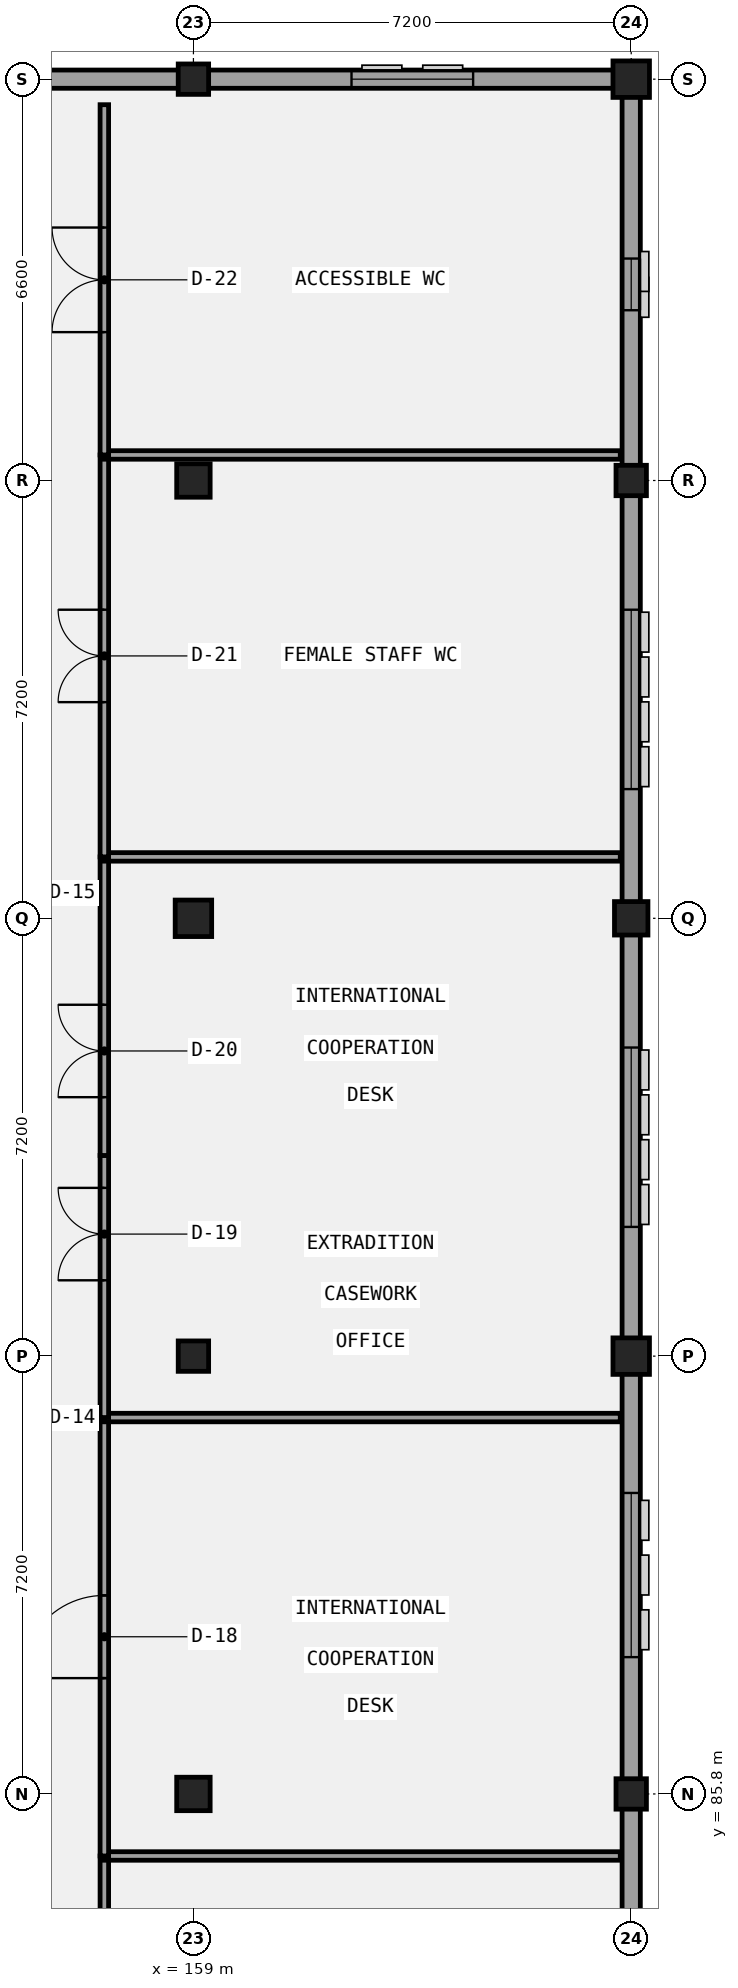
"""IFC4 building model, lengths in metres.
Left out: names, types, materials, properties, quantities, classifications, styles, units other than length and angle.
Written with IfcOpenShell. Run it as: python <this file> out.ifc"""

import sys

from ifc_helpers import new_model, si_unit, direction, frame, frame_2d, origin, origin_2d, place, context, subcontext, project, spatial, rectangle, extrude, element, fill, save


model = new_model("IFC4")
c1 = context("Model", 3, precision=1e-05, world=origin(), true_north=direction((0.0, 1.0)))
c2 = subcontext(c1, "Body", "Model", "MODEL_VIEW")
j1 = project(units=[si_unit("LENGTHUNIT", "METRE"), si_unit("PLANEANGLEUNIT", "RADIAN")], contexts=[c1])
p1 = place(None, origin())
s1 = spatial("IfcSite", under=j1, at=p1, CompositionType="ELEMENT")
p2 = place(p1, origin())
s2 = spatial("IfcBuilding", under=s1, at=p2, CompositionType="ELEMENT")
p3 = place(p2, frame((0.0, 0.0, 18.0)))
s3 = spatial("IfcBuildingStorey", under=s2, at=p3, CompositionType="ELEMENT", Elevation=18.0)
p4 = place(p3, frame((159.0, 85.8, 0.0), z_axis=(0.0, 0.0, 1.0), x_axis=(1.0, 0.0, 0.0)))
e1 = element("IfcColumn", 1, at=p4, inside=s3, PredefinedType="COLUMN", context=c2, shape_type="SweptSolid", body=[
    extrude(rectangle(XDim=0.55, YDim=0.55, at=origin_2d()), origin(), (0.0, 0.0, 1.0), 4.2),
])
p5 = place(p3, frame((159.0, 93.0, 0.0), z_axis=(0.0, 0.0, 1.0), x_axis=(1.0, 0.0, 0.0)))
e2 = element("IfcColumn", 2, at=p5, inside=s3, PredefinedType="COLUMN", context=c2, shape_type="SweptSolid", body=[
    extrude(rectangle(XDim=0.5, YDim=0.5, at=origin_2d()), origin(), (0.0, 0.0, 1.0), 4.2),
])
p6 = place(p3, frame((159.0, 100.2, 0.0), z_axis=(0.0, 0.0, 1.0), x_axis=(1.0, 0.0, 0.0)))
e3 = element("IfcColumn", 3, at=p6, inside=s3, PredefinedType="COLUMN", context=c2, shape_type="SweptSolid", body=[
    extrude(rectangle(XDim=0.6, YDim=0.6, at=origin_2d()), origin(), (0.0, 0.0, 1.0), 4.2),
])
p7 = place(p3, frame((159.0, 107.4, 0.0), z_axis=(0.0, 0.0, 1.0), x_axis=(1.0, 0.0, 0.0)))
e4 = element("IfcColumn", 4, at=p7, inside=s3, PredefinedType="COLUMN", context=c2, shape_type="SweptSolid", body=[
    extrude(rectangle(XDim=0.55, YDim=0.55, at=origin_2d()), origin(), (0.0, 0.0, 1.0), 4.2),
])
for number, where, z_axis, x_axis in (
    (5, (159.0, 114.0, 0.0), (0.0, 0.0, 1.0), (1.0, 0.0, 0.0)),
    (6, (166.2, 85.8, 0.0), (0.0, 0.0, 1.0), (1.0, 0.0, 0.0)),
):
    element("IfcColumn", number, at=place(p3, frame(where, z_axis=z_axis, x_axis=x_axis)), inside=s3, PredefinedType="COLUMN", context=c2, shape_type="SweptSolid", body=[
        extrude(rectangle(XDim=0.5, YDim=0.5, at=origin_2d()), origin(), (0.0, 0.0, 1.0), 4.2),
    ])
p8 = place(p3, frame((166.2, 93.0, 0.0), z_axis=(0.0, 0.0, 1.0), x_axis=(1.0, 0.0, 0.0)))
e7 = element("IfcColumn", 7, at=p8, inside=s3, PredefinedType="COLUMN", context=c2, shape_type="SweptSolid", body=[
    extrude(rectangle(XDim=0.6, YDim=0.6, at=origin_2d()), origin(), (0.0, 0.0, 1.0), 4.2),
])
p9 = place(p3, frame((166.2, 100.2, 0.0), z_axis=(0.0, 0.0, 1.0), x_axis=(1.0, 0.0, 0.0)))
e8 = element("IfcColumn", 8, at=p9, inside=s3, PredefinedType="COLUMN", context=c2, shape_type="SweptSolid", body=[
    extrude(rectangle(XDim=0.55, YDim=0.55, at=origin_2d()), origin(), (0.0, 0.0, 1.0), 4.2),
])
p10 = place(p3, frame((166.2, 107.4, 0.0), z_axis=(0.0, 0.0, 1.0), x_axis=(1.0, 0.0, 0.0)))
e9 = element("IfcColumn", 9, at=p10, inside=s3, PredefinedType="COLUMN", context=c2, shape_type="SweptSolid", body=[
    extrude(rectangle(XDim=0.5, YDim=0.5, at=origin_2d()), origin(), (0.0, 0.0, 1.0), 4.2),
])
p11 = place(p3, frame((166.2, 114.0, 0.0), z_axis=(0.0, 0.0, 1.0), x_axis=(1.0, 0.0, 0.0)))
e10 = element("IfcColumn", 10, at=p11, inside=s3, PredefinedType="COLUMN", context=c2, shape_type="SweptSolid", body=[
    extrude(rectangle(XDim=0.6, YDim=0.6, at=origin_2d()), origin(), (0.0, 0.0, 1.0), 4.2),
])
p12 = place(p3, frame((166.2, 78.75, 0.0), z_axis=(0.0, 0.0, 1.0), x_axis=(0.0, 1.0, 0.0)))
e11 = element("IfcWall", 11, at=p12, inside=s3, PredefinedType="SOLIDWALL", context=c2, shape_type="SweptSolid", body=[
    extrude(rectangle(XDim=35.1, YDim=0.3, at=frame_2d((17.55, 0.0))), origin(), (0.0, 0.0, 1.0), 2.94),
])
p13 = place(p12, frame((2.175, 0.0, 0.95)))
e12 = element("IfcOpeningElement", 12, at=p13, cuts=e11, PredefinedType="OPENING", context=c2, shape_type="SweptSolid", body=[
    extrude(rectangle(XDim=2.7, YDim=1.4, at=frame_2d((1.35, 0.7))), frame((0.0, 0.16, 0.0), z_axis=(0.0, -1.0, 0.0), x_axis=(1.0, 0.0, 0.0)), (0.0, 0.0, 1.0), 0.32),
])
p14 = place(p12, frame((9.3, 0.0, 0.95)))
e13 = element("IfcOpeningElement", 13, at=p14, cuts=e11, PredefinedType="OPENING", context=c2, shape_type="SweptSolid", body=[
    extrude(rectangle(XDim=2.7, YDim=1.65, at=frame_2d((1.35, 0.825))), frame((0.0, 0.16, 0.0), z_axis=(0.0, -1.0, 0.0), x_axis=(1.0, 0.0, 0.0)), (0.0, 0.0, 1.0), 0.32),
])
p15 = place(p12, frame((16.375, 0.0, 0.95)))
e14 = element("IfcOpeningElement", 14, at=p15, cuts=e11, PredefinedType="OPENING", context=c2, shape_type="SweptSolid", body=[
    extrude(rectangle(XDim=2.95, YDim=1.4, at=frame_2d((1.475, 0.7))), frame((0.0, 0.16, 0.0), z_axis=(0.0, -1.0, 0.0), x_axis=(1.0, 0.0, 0.0)), (0.0, 0.0, 1.0), 0.32),
])
p16 = place(p12, frame((23.575, 0.0, 0.95)))
e15 = element("IfcOpeningElement", 15, at=p16, cuts=e11, PredefinedType="OPENING", context=c2, shape_type="SweptSolid", body=[
    extrude(rectangle(XDim=2.95, YDim=1.65, at=frame_2d((1.475, 0.825))), frame((0.0, 0.16, 0.0), z_axis=(0.0, -1.0, 0.0), x_axis=(1.0, 0.0, 0.0)), (0.0, 0.0, 1.0), 0.32),
])
p17 = place(p12, frame((31.45, 0.0, 0.95)))
e16 = element("IfcOpeningElement", 16, at=p17, cuts=e11, PredefinedType="OPENING", context=c2, shape_type="SweptSolid", body=[
    extrude(rectangle(XDim=0.85, YDim=1.4, at=frame_2d((0.425, 0.7))), frame((0.0, 0.16, 0.0), z_axis=(0.0, -1.0, 0.0), x_axis=(1.0, 0.0, 0.0)), (0.0, 0.0, 1.0), 0.32),
])
p18 = place(p3, frame((166.35, 114.0, 0.0), z_axis=(0.0, 0.0, 1.0), x_axis=(-1.0, 0.0, 0.0)))
e17 = element("IfcWall", 17, at=p18, inside=s3, PredefinedType="SOLIDWALL", context=c2, shape_type="SweptSolid", body=[
    extrude(rectangle(XDim=21.9, YDim=0.3, at=frame_2d((10.95, 0.0))), origin(), (0.0, 0.0, 1.0), 3.19),
])
p19 = place(p18, frame((17.25, 0.0, 0.95)))
e18 = element("IfcOpeningElement", 18, at=p19, cuts=e17, PredefinedType="OPENING", context=c2, shape_type="SweptSolid", body=[
    extrude(rectangle(XDim=1.8, YDim=1.9, at=frame_2d((0.9, 0.95))), frame((0.0, 0.16, 0.0), z_axis=(0.0, -1.0, 0.0), x_axis=(1.0, 0.0, 0.0)), (0.0, 0.0, 1.0), 0.32),
])
p20 = place(p18, frame((9.95, 0.0, 0.95)))
e19 = element("IfcOpeningElement", 19, at=p20, cuts=e17, PredefinedType="OPENING", context=c2, shape_type="SweptSolid", body=[
    extrude(rectangle(XDim=2.0, YDim=1.4, at=frame_2d((1.0, 0.7))), frame((0.0, 0.16, 0.0), z_axis=(0.0, -1.0, 0.0), x_axis=(1.0, 0.0, 0.0)), (0.0, 0.0, 1.0), 0.32),
])
p21 = place(p18, frame((2.75, 0.0, 0.95)))
e20 = element("IfcOpeningElement", 20, at=p21, cuts=e17, PredefinedType="OPENING", context=c2, shape_type="SweptSolid", body=[
    extrude(rectangle(XDim=2.0, YDim=1.65, at=frame_2d((1.0, 0.825))), frame((0.0, 0.16, 0.0), z_axis=(0.0, -1.0, 0.0), x_axis=(1.0, 0.0, 0.0)), (0.0, 0.0, 1.0), 0.32),
])
p22 = place(p3, frame((157.535, 79.02, 0.0), z_axis=(0.0, 0.0, 1.0), x_axis=(0.0, 1.0, 0.0)))
e21 = element("IfcWall", 21, at=p22, inside=s3, PredefinedType="PARTITIONING", context=c2, shape_type="SweptSolid", body=[
    extrude(rectangle(XDim=5.76, YDim=0.14, at=frame_2d((2.88, 0.0))), origin(), (0.0, 0.0, 1.0), 3.94),
])
p23 = place(p22, frame((2.2, 0.0, 0.0)))
e22 = element("IfcOpeningElement", 22, at=p23, cuts=e21, PredefinedType="OPENING", context=c2, shape_type="SweptSolid", body=[
    extrude(rectangle(XDim=1.36, YDim=2.22, at=frame_2d((0.68, 1.11))), frame((0.0, 0.08, 0.0), z_axis=(0.0, -1.0, 0.0), x_axis=(1.0, 0.0, 0.0)), (0.0, 0.0, 1.0), 0.16),
])
p24 = place(p3, frame((157.535, 84.78, 0.0), z_axis=(0.0, 0.0, 1.0), x_axis=(1.0, 0.0, 0.0)))
e23 = element("IfcWall", 23, at=p24, inside=s3, PredefinedType="PARTITIONING", context=c2, shape_type="SweptSolid", body=[
    extrude(rectangle(XDim=8.485, YDim=0.14, at=frame_2d((4.243, 0.0))), origin(), (0.0, 0.0, 1.0), 3.94),
])
p25 = place(p3, frame((157.535, 84.78, 0.0), z_axis=(0.0, 0.0, 1.0), x_axis=(0.0, 1.0, 0.0)))
e24 = element("IfcWall", 24, at=p25, inside=s3, PredefinedType="PARTITIONING", context=c2, shape_type="SweptSolid", body=[
    extrude(rectangle(XDim=7.21, YDim=0.14, at=frame_2d((3.605, 0.0))), origin(), (0.0, 0.0, 1.0), 3.94),
])
p26 = place(p25, frame((2.925, 0.0, 0.0)))
e25 = element("IfcOpeningElement", 25, at=p26, cuts=e24, PredefinedType="OPENING", context=c2, shape_type="SweptSolid", body=[
    extrude(rectangle(XDim=1.36, YDim=2.35, at=frame_2d((0.68, 1.175))), frame((0.0, 0.08, 0.0), z_axis=(0.0, -1.0, 0.0), x_axis=(1.0, 0.0, 0.0)), (0.0, 0.0, 1.0), 0.16),
])
p27 = place(p3, frame((157.535, 91.99, 0.0), z_axis=(0.0, 0.0, 1.0), x_axis=(1.0, 0.0, 0.0)))
e26 = element("IfcWall", 26, at=p27, inside=s3, PredefinedType="PARTITIONING", context=c2, shape_type="SweptSolid", body=[
    extrude(rectangle(XDim=8.485, YDim=0.14, at=frame_2d((4.243, 0.0))), origin(), (0.0, 0.0, 1.0), 3.94),
])
p28 = place(p3, frame((157.535, 91.99, 0.0), z_axis=(0.0, 0.0, 1.0), x_axis=(0.0, 1.0, 0.0)))
e27 = element("IfcWall", 27, at=p28, inside=s3, PredefinedType="PARTITIONING", context=c2, shape_type="SweptSolid", body=[
    extrude(rectangle(XDim=4.31, YDim=0.14, at=frame_2d((2.155, 0.0))), origin(), (0.0, 0.0, 1.0), 3.94),
])
p29 = place(p28, frame((2.257, 0.0, 0.0)))
e28 = element("IfcOpeningElement", 28, at=p29, cuts=e27, PredefinedType="OPENING", context=c2, shape_type="SweptSolid", body=[
    extrude(rectangle(XDim=1.52, YDim=2.1, at=frame_2d((0.76, 1.05))), frame((0.0, 0.08, 0.0), z_axis=(0.0, -1.0, 0.0), x_axis=(1.0, 0.0, 0.0)), (0.0, 0.0, 1.0), 0.16),
])
p30 = place(p3, frame((157.535, 96.3, 0.0), z_axis=(0.0, 0.0, 1.0), x_axis=(0.0, 1.0, 0.0)))
e29 = element("IfcWall", 29, at=p30, inside=s3, PredefinedType="PARTITIONING", context=c2, shape_type="SweptSolid", body=[
    extrude(rectangle(XDim=4.91, YDim=0.14, at=frame_2d((2.455, 0.0))), origin(), (0.0, 0.0, 1.0), 3.94),
])
p31 = place(p30, frame((0.958, 0.0, 0.0)))
e30 = element("IfcOpeningElement", 30, at=p31, cuts=e29, PredefinedType="OPENING", context=c2, shape_type="SweptSolid", body=[
    extrude(rectangle(XDim=1.52, YDim=2.22, at=frame_2d((0.76, 1.11))), frame((0.0, 0.08, 0.0), z_axis=(0.0, -1.0, 0.0), x_axis=(1.0, 0.0, 0.0)), (0.0, 0.0, 1.0), 0.16),
])
p32 = place(p3, frame((157.535, 101.21, 0.0), z_axis=(0.0, 0.0, 1.0), x_axis=(1.0, 0.0, 0.0)))
e31 = element("IfcWall", 31, at=p32, inside=s3, PredefinedType="PARTITIONING", context=c2, shape_type="SweptSolid", body=[
    extrude(rectangle(XDim=8.485, YDim=0.14, at=frame_2d((4.243, 0.0))), origin(), (0.0, 0.0, 1.0), 3.94),
])
p33 = place(p3, frame((157.535, 101.21, 0.0), z_axis=(0.0, 0.0, 1.0), x_axis=(0.0, 1.0, 0.0)))
e32 = element("IfcWall", 32, at=p33, inside=s3, PredefinedType="PARTITIONING", context=c2, shape_type="SweptSolid", body=[
    extrude(rectangle(XDim=6.61, YDim=0.14, at=frame_2d((3.305, 0.0))), origin(), (0.0, 0.0, 1.0), 3.94),
])
p34 = place(p33, frame((2.545, 0.0, 0.0)))
e33 = element("IfcOpeningElement", 33, at=p34, cuts=e32, PredefinedType="OPENING", context=c2, shape_type="SweptSolid", body=[
    extrude(rectangle(XDim=1.52, YDim=2.35, at=frame_2d((0.76, 1.175))), frame((0.0, 0.08, 0.0), z_axis=(0.0, -1.0, 0.0), x_axis=(1.0, 0.0, 0.0)), (0.0, 0.0, 1.0), 0.16),
])
p35 = place(p3, frame((157.535, 107.82, 0.0), z_axis=(0.0, 0.0, 1.0), x_axis=(1.0, 0.0, 0.0)))
e34 = element("IfcWall", 34, at=p35, inside=s3, PredefinedType="PARTITIONING", context=c2, shape_type="SweptSolid", body=[
    extrude(rectangle(XDim=8.485, YDim=0.14, at=frame_2d((4.243, 0.0))), origin(), (0.0, 0.0, 1.0), 3.94),
])
p36 = place(p3, frame((157.535, 107.82, 0.0), z_axis=(0.0, 0.0, 1.0), x_axis=(0.0, 1.0, 0.0)))
e35 = element("IfcWall", 35, at=p36, inside=s3, PredefinedType="PARTITIONING", context=c2, shape_type="SweptSolid", body=[
    extrude(rectangle(XDim=5.76, YDim=0.14, at=frame_2d((2.88, 0.0))), origin(), (0.0, 0.0, 1.0), 3.94),
])
p37 = place(p36, frame((2.02, 0.0, 0.0)))
e36 = element("IfcOpeningElement", 36, at=p37, cuts=e35, PredefinedType="OPENING", context=c2, shape_type="SweptSolid", body=[
    extrude(rectangle(XDim=1.72, YDim=2.1, at=frame_2d((0.86, 1.05))), frame((0.0, 0.08, 0.0), z_axis=(0.0, -1.0, 0.0), x_axis=(1.0, 0.0, 0.0)), (0.0, 0.0, 1.0), 0.16),
])
p38 = place(p14, origin())
e37 = element("IfcWindow", 37, at=p38, inside=s3, PartitioningType="SINGLE_PANEL", PredefinedType="WINDOW", context=c2, shape_type="SweptSolid", body=[
    extrude(rectangle(XDim=2.7, YDim=1.65, at=frame_2d((1.35, 0.825))), frame((0.0, 0.03, 0.0), z_axis=(0.0, -1.0, 0.0), x_axis=(1.0, 0.0, 0.0)), (0.0, 0.0, 1.0), 0.06),
])
fill(e13, e37)
p39 = place(p15, origin())
e38 = element("IfcWindow", 38, at=p39, inside=s3, PartitioningType="SINGLE_PANEL", PredefinedType="WINDOW", context=c2, shape_type="SweptSolid", body=[
    extrude(rectangle(XDim=2.95, YDim=1.4, at=frame_2d((1.475, 0.7))), frame((0.0, 0.03, 0.0), z_axis=(0.0, -1.0, 0.0), x_axis=(1.0, 0.0, 0.0)), (0.0, 0.0, 1.0), 0.06),
])
fill(e14, e38)
p40 = place(p16, origin())
e39 = element("IfcWindow", 39, at=p40, inside=s3, PartitioningType="SINGLE_PANEL", PredefinedType="WINDOW", context=c2, shape_type="SweptSolid", body=[
    extrude(rectangle(XDim=2.95, YDim=1.65, at=frame_2d((1.475, 0.825))), frame((0.0, 0.03, 0.0), z_axis=(0.0, -1.0, 0.0), x_axis=(1.0, 0.0, 0.0)), (0.0, 0.0, 1.0), 0.06),
])
fill(e15, e39)
p41 = place(p17, origin())
e40 = element("IfcWindow", 40, at=p41, inside=s3, PartitioningType="SINGLE_PANEL", PredefinedType="WINDOW", context=c2, shape_type="SweptSolid", body=[
    extrude(rectangle(XDim=0.85, YDim=1.4, at=frame_2d((0.425, 0.7))), frame((0.0, 0.03, 0.0), z_axis=(0.0, -1.0, 0.0), x_axis=(1.0, 0.0, 0.0)), (0.0, 0.0, 1.0), 0.06),
])
fill(e16, e40)
p42 = place(p21, origin())
e41 = element("IfcWindow", 41, at=p42, inside=s3, PartitioningType="SINGLE_PANEL", PredefinedType="WINDOW", context=c2, shape_type="SweptSolid", body=[
    extrude(rectangle(XDim=2.0, YDim=1.65, at=frame_2d((1.0, 0.825))), frame((0.0, 0.03, 0.0), z_axis=(0.0, -1.0, 0.0), x_axis=(1.0, 0.0, 0.0)), (0.0, 0.0, 1.0), 0.06),
])
fill(e20, e41)
p43 = place(p26, origin())
e42 = element("IfcDoor", 42, at=p43, inside=s3, OperationType="SINGLE_SWING_LEFT", PredefinedType="DOOR", context=c2, shape_type="SweptSolid", body=[
    extrude(rectangle(XDim=1.36, YDim=2.35, at=frame_2d((0.68, 1.175))), frame((0.0, 0.025, 0.0), z_axis=(0.0, -1.0, 0.0), x_axis=(1.0, 0.0, 0.0)), (0.0, 0.0, 1.0), 0.05),
])
fill(e25, e42)
p44 = place(p29, origin())
e43 = element("IfcDoor", 43, at=p44, inside=s3, OperationType="DOUBLE_DOOR_SINGLE_SWING", PredefinedType="DOOR", context=c2, shape_type="SweptSolid", body=[
    extrude(rectangle(XDim=1.52, YDim=2.1, at=frame_2d((0.76, 1.05))), frame((0.0, 0.025, 0.0), z_axis=(0.0, -1.0, 0.0), x_axis=(1.0, 0.0, 0.0)), (0.0, 0.0, 1.0), 0.05),
])
fill(e28, e43)
p45 = place(p31, origin())
e44 = element("IfcDoor", 44, at=p45, inside=s3, OperationType="DOUBLE_DOOR_SINGLE_SWING", PredefinedType="DOOR", context=c2, shape_type="SweptSolid", body=[
    extrude(rectangle(XDim=1.52, YDim=2.22, at=frame_2d((0.76, 1.11))), frame((0.0, 0.025, 0.0), z_axis=(0.0, -1.0, 0.0), x_axis=(1.0, 0.0, 0.0)), (0.0, 0.0, 1.0), 0.05),
])
fill(e30, e44)
p46 = place(p34, origin())
e45 = element("IfcDoor", 45, at=p46, inside=s3, OperationType="DOUBLE_DOOR_SINGLE_SWING", PredefinedType="DOOR", context=c2, shape_type="SweptSolid", body=[
    extrude(rectangle(XDim=1.52, YDim=2.35, at=frame_2d((0.76, 1.175))), frame((0.0, 0.025, 0.0), z_axis=(0.0, -1.0, 0.0), x_axis=(1.0, 0.0, 0.0)), (0.0, 0.0, 1.0), 0.05),
])
fill(e33, e45)
p47 = place(p37, origin())
e46 = element("IfcDoor", 46, at=p47, inside=s3, OperationType="DOUBLE_DOOR_SINGLE_SWING", PredefinedType="DOOR", context=c2, shape_type="SweptSolid", body=[
    extrude(rectangle(XDim=1.72, YDim=2.1, at=frame_2d((0.86, 1.05))), frame((0.0, 0.025, 0.0), z_axis=(0.0, -1.0, 0.0), x_axis=(1.0, 0.0, 0.0)), (0.0, 0.0, 1.0), 0.05),
])
fill(e36, e46)
save(model, sys.argv[1])
